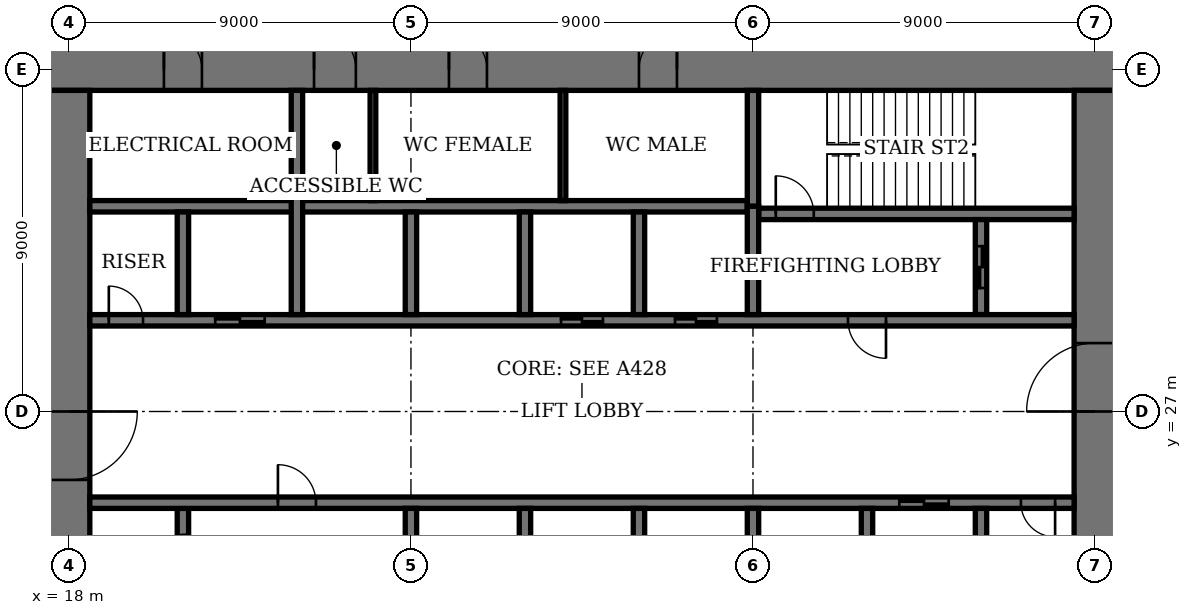
"""IFC4 building model, lengths in metres.
Left out: names, types, materials, properties, quantities, classifications, styles, units other than length and angle.
Written with IfcOpenShell. Run it as: python <this file> out.ifc"""

import sys

from ifc_helpers import new_model, si_unit, direction, frame, frame_2d, origin, place, context, subcontext, project, spatial, rectangle, extrude, element, fill, save


model = new_model("IFC4")
c1 = context("Model", 3, precision=1e-05, world=origin(), true_north=direction((0.0, 1.0)))
c2 = subcontext(c1, "Body", "Model", "MODEL_VIEW")
j1 = project(units=[si_unit("LENGTHUNIT", "METRE"), si_unit("PLANEANGLEUNIT", "RADIAN")], contexts=[c1])
p1 = place(None, origin())
s1 = spatial("IfcSite", under=j1, at=p1, CompositionType="ELEMENT")
p2 = place(p1, origin())
s2 = spatial("IfcBuilding", under=s1, at=p2, CompositionType="ELEMENT")
p3 = place(p2, frame((0.0, 0.0, 129.0)))
s3 = spatial("IfcBuildingStorey", under=s2, at=p3, CompositionType="ELEMENT", Elevation=129.0)
p4 = place(p3, frame((45.55, 36.0, 0.0), z_axis=(0.0, 0.0, 1.0), x_axis=(-1.0, 0.0, 0.0)))
e1 = element("IfcWall", 1, at=p4, inside=s3, PredefinedType="SHEAR", context=c2, shape_type="SweptSolid", body=[
    extrude(rectangle(XDim=28.1, YDim=1.1, at=frame_2d((14.05, 0.0))), origin(), (0.0, 0.0, 1.0), 4.0),
])
p5 = place(p4, frame((11.55, 0.0, 0.0)))
e2 = element("IfcOpeningElement", 2, at=p5, cuts=e1, PredefinedType="OPENING", context=c2, shape_type="SweptSolid", body=[
    extrude(rectangle(XDim=1.0, YDim=2.4, at=frame_2d((0.5, 1.2))), frame((0.0, 0.56, 0.0), z_axis=(0.0, -1.0, 0.0), x_axis=(1.0, 0.0, 0.0)), (0.0, 0.0, 1.0), 1.12),
])
p6 = place(p4, frame((16.55, 0.0, 0.0)))
e3 = element("IfcOpeningElement", 3, at=p6, cuts=e1, PredefinedType="OPENING", context=c2, shape_type="SweptSolid", body=[
    extrude(rectangle(XDim=1.0, YDim=2.4, at=frame_2d((0.5, 1.2))), frame((0.0, 0.56, 0.0), z_axis=(0.0, -1.0, 0.0), x_axis=(1.0, 0.0, 0.0)), (0.0, 0.0, 1.0), 1.12),
])
p7 = place(p4, frame((20.0, 0.0, 0.0)))
e4 = element("IfcOpeningElement", 4, at=p7, cuts=e1, PredefinedType="OPENING", context=c2, shape_type="SweptSolid", body=[
    extrude(rectangle(XDim=1.1, YDim=2.4, at=frame_2d((0.55, 1.2))), frame((0.0, 0.56, 0.0), z_axis=(0.0, -1.0, 0.0), x_axis=(1.0, 0.0, 0.0)), (0.0, 0.0, 1.0), 1.12),
])
p8 = place(p4, frame((24.05, 0.0, 0.0)))
e5 = element("IfcOpeningElement", 5, at=p8, cuts=e1, PredefinedType="OPENING", context=c2, shape_type="SweptSolid", body=[
    extrude(rectangle(XDim=1.0, YDim=2.4, at=frame_2d((0.5, 1.2))), frame((0.0, 0.56, 0.0), z_axis=(0.0, -1.0, 0.0), x_axis=(1.0, 0.0, 0.0)), (0.0, 0.0, 1.0), 1.12),
])
p9 = place(p3, frame((18.0, 35.45, 0.0), z_axis=(0.0, 0.0, 1.0), x_axis=(0.0, -1.0, 0.0)))
e6 = element("IfcWall", 6, at=p9, inside=s3, PredefinedType="SHEAR", context=c2, shape_type="SweptSolid", body=[
    extrude(rectangle(XDim=16.9, YDim=1.1, at=frame_2d((8.45, 0.0))), origin(), (0.0, 0.0, 1.0), 4.0),
])
p10 = place(p9, frame((8.45, 0.0, 0.0)))
e7 = element("IfcOpeningElement", 7, at=p10, cuts=e6, PredefinedType="OPENING", context=c2, shape_type="SweptSolid", body=[
    extrude(rectangle(XDim=1.8, YDim=2.4, at=frame_2d((0.9, 1.2))), frame((0.0, 0.56, 0.0), z_axis=(0.0, -1.0, 0.0), x_axis=(1.0, 0.0, 0.0)), (0.0, 0.0, 1.0), 1.12),
])
p11 = place(p3, frame((45.0, 18.55, 0.0), z_axis=(0.0, 0.0, 1.0), x_axis=(0.0, 1.0, 0.0)))
e8 = element("IfcWall", 8, at=p11, inside=s3, PredefinedType="SHEAR", context=c2, shape_type="SweptSolid", body=[
    extrude(rectangle(XDim=16.9, YDim=1.1, at=frame_2d((8.45, 0.0))), origin(), (0.0, 0.0, 1.0), 4.0),
])
p12 = place(p11, frame((8.45, 0.0, 0.0)))
e9 = element("IfcOpeningElement", 9, at=p12, cuts=e8, PredefinedType="OPENING", context=c2, shape_type="SweptSolid", body=[
    extrude(rectangle(XDim=1.8, YDim=2.4, at=frame_2d((0.9, 1.2))), frame((0.0, 0.56, 0.0), z_axis=(0.0, -1.0, 0.0), x_axis=(1.0, 0.0, 0.0)), (0.0, 0.0, 1.0), 1.12),
])
p13 = place(p3, frame((36.15, 32.2, 0.0), z_axis=(0.0, 0.0, 1.0), x_axis=(1.0, 0.0, 0.0)))
e10 = element("IfcWall", 10, at=p13, inside=s3, PredefinedType="SHEAR", context=c2, shape_type="SweptSolid", body=[
    extrude(rectangle(XDim=8.3, YDim=0.3, at=frame_2d((4.15, 0.0))), origin(), (0.0, 0.0, 1.0), 4.0),
])
p14 = place(p13, frame((0.45, 0.0, 0.0)))
e11 = element("IfcOpeningElement", 11, at=p14, cuts=e10, PredefinedType="OPENING", context=c2, shape_type="SweptSolid", body=[
    extrude(rectangle(XDim=1.0, YDim=2.4, at=frame_2d((0.5, 1.2))), frame((0.0, 0.16, 0.0), z_axis=(0.0, -1.0, 0.0), x_axis=(1.0, 0.0, 0.0)), (0.0, 0.0, 1.0), 0.32),
])
p15 = place(p3, frame((36.0, 32.4, 0.0), z_axis=(0.0, 0.0, 1.0), x_axis=(0.0, 1.0, 0.0)))
e12 = element("IfcWall", 12, at=p15, inside=s3, PredefinedType="SHEAR", context=c2, shape_type="SweptSolid", body=[
    extrude(rectangle(XDim=3.05, YDim=0.3, at=frame_2d((1.525, 0.0))), origin(), (0.0, 0.0, 1.0), 4.0),
])
p16 = place(p3, frame((21.0, 21.95, 0.0), z_axis=(0.0, 0.0, 1.0), x_axis=(0.0, 1.0, 0.0)))
e13 = element("IfcWall", 13, at=p16, inside=s3, PredefinedType="SHEAR", context=c2, shape_type="SweptSolid", body=[
    extrude(rectangle(XDim=2.5, YDim=0.3, at=frame_2d((1.25, 0.0))), origin(), (0.0, 0.0, 1.0), 4.0),
])
p17 = place(p16, frame((0.7, 0.0, 0.0)))
e14 = element("IfcOpeningElement", 14, at=p17, cuts=e13, PredefinedType="OPENING", context=c2, shape_type="SweptSolid", body=[
    extrude(rectangle(XDim=1.1, YDim=2.4, at=frame_2d((0.55, 1.2))), frame((0.0, 0.16, 0.0), z_axis=(0.0, -1.0, 0.0), x_axis=(1.0, 0.0, 0.0)), (0.0, 0.0, 1.0), 0.32),
])
p18 = place(p3, frame((42.0, 29.55, 0.0), z_axis=(0.0, 0.0, 1.0), x_axis=(0.0, 1.0, 0.0)))
e15 = element("IfcWall", 15, at=p18, inside=s3, PredefinedType="SHEAR", context=c2, shape_type="SweptSolid", body=[
    extrude(rectangle(XDim=2.5, YDim=0.3, at=frame_2d((1.25, 0.0))), origin(), (0.0, 0.0, 1.0), 4.0),
])
p19 = place(p18, frame((0.7, 0.0, 0.0)))
e16 = element("IfcOpeningElement", 16, at=p19, cuts=e15, PredefinedType="OPENING", context=c2, shape_type="SweptSolid", body=[
    extrude(rectangle(XDim=1.1, YDim=2.4, at=frame_2d((0.55, 1.2))), frame((0.0, 0.16, 0.0), z_axis=(0.0, -1.0, 0.0), x_axis=(1.0, 0.0, 0.0)), (0.0, 0.0, 1.0), 0.32),
])
p20 = place(p3, frame((18.55, 24.6, 0.0), z_axis=(0.0, 0.0, 1.0), x_axis=(1.0, 0.0, 0.0)))
e17 = element("IfcWall", 17, at=p20, inside=s3, PredefinedType="SHEAR", context=c2, shape_type="SweptSolid", body=[
    extrude(rectangle(XDim=25.9, YDim=0.3, at=frame_2d((12.95, 0.0))), origin(), (0.0, 0.0, 1.0), 4.0),
])
p21 = place(p20, frame((4.95, 0.0, 0.0)))
e18 = element("IfcOpeningElement", 18, at=p21, cuts=e17, PredefinedType="OPENING", context=c2, shape_type="SweptSolid", body=[
    extrude(rectangle(XDim=1.0, YDim=2.4, at=frame_2d((0.5, 1.2))), frame((0.0, 0.16, 0.0), z_axis=(0.0, -1.0, 0.0), x_axis=(1.0, 0.0, 0.0)), (0.0, 0.0, 1.0), 0.32),
])
p22 = place(p20, frame((24.5, 0.0, 0.0)))
e19 = element("IfcOpeningElement", 19, at=p22, cuts=e17, PredefinedType="OPENING", context=c2, shape_type="SweptSolid", body=[
    extrude(rectangle(XDim=0.9, YDim=2.1, at=frame_2d((0.45, 1.05))), frame((0.0, 0.16, 0.0), z_axis=(0.0, -1.0, 0.0), x_axis=(1.0, 0.0, 0.0)), (0.0, 0.0, 1.0), 0.32),
])
p23 = place(p20, frame((21.3, 0.0, 0.0)))
e20 = element("IfcOpeningElement", 20, at=p23, cuts=e17, PredefinedType="OPENING", context=c2, shape_type="SweptSolid", body=[
    extrude(rectangle(XDim=1.3, YDim=2.4, at=frame_2d((0.65, 1.2))), frame((0.0, 0.16, 0.0), z_axis=(0.0, -1.0, 0.0), x_axis=(1.0, 0.0, 0.0)), (0.0, 0.0, 1.0), 0.32),
])
p24 = place(p3, frame((18.55, 29.4, 0.0), z_axis=(0.0, 0.0, 1.0), x_axis=(1.0, 0.0, 0.0)))
e21 = element("IfcWall", 21, at=p24, inside=s3, PredefinedType="SHEAR", context=c2, shape_type="SweptSolid", body=[
    extrude(rectangle(XDim=25.9, YDim=0.3, at=frame_2d((12.95, 0.0))), origin(), (0.0, 0.0, 1.0), 4.0),
])
p25 = place(p24, frame((19.95, 0.0, 0.0)))
e22 = element("IfcOpeningElement", 22, at=p25, cuts=e21, PredefinedType="OPENING", context=c2, shape_type="SweptSolid", body=[
    extrude(rectangle(XDim=1.0, YDim=2.4, at=frame_2d((0.5, 1.2))), frame((0.0, 0.16, 0.0), z_axis=(0.0, -1.0, 0.0), x_axis=(1.0, 0.0, 0.0)), (0.0, 0.0, 1.0), 0.32),
])
p26 = place(p24, frame((0.5, 0.0, 0.0)))
e23 = element("IfcOpeningElement", 23, at=p26, cuts=e21, PredefinedType="OPENING", context=c2, shape_type="SweptSolid", body=[
    extrude(rectangle(XDim=0.9, YDim=2.1, at=frame_2d((0.45, 1.05))), frame((0.0, 0.16, 0.0), z_axis=(0.0, -1.0, 0.0), x_axis=(1.0, 0.0, 0.0)), (0.0, 0.0, 1.0), 0.32),
])
p27 = place(p24, frame((15.4, 0.0, 0.0)))
e24 = element("IfcOpeningElement", 24, at=p27, cuts=e21, PredefinedType="OPENING", context=c2, shape_type="SweptSolid", body=[
    extrude(rectangle(XDim=1.1, YDim=2.4, at=frame_2d((0.55, 1.2))), frame((0.0, 0.16, 0.0), z_axis=(0.0, -1.0, 0.0), x_axis=(1.0, 0.0, 0.0)), (0.0, 0.0, 1.0), 0.32),
])
p28 = place(p24, frame((12.4, 0.0, 0.0)))
e25 = element("IfcOpeningElement", 25, at=p28, cuts=e21, PredefinedType="OPENING", context=c2, shape_type="SweptSolid", body=[
    extrude(rectangle(XDim=1.1, YDim=2.4, at=frame_2d((0.55, 1.2))), frame((0.0, 0.16, 0.0), z_axis=(0.0, -1.0, 0.0), x_axis=(1.0, 0.0, 0.0)), (0.0, 0.0, 1.0), 0.32),
])
p29 = place(p24, frame((3.3, 0.0, 0.0)))
e26 = element("IfcOpeningElement", 26, at=p29, cuts=e21, PredefinedType="OPENING", context=c2, shape_type="SweptSolid", body=[
    extrude(rectangle(XDim=1.3, YDim=2.4, at=frame_2d((0.65, 1.2))), frame((0.0, 0.16, 0.0), z_axis=(0.0, -1.0, 0.0), x_axis=(1.0, 0.0, 0.0)), (0.0, 0.0, 1.0), 0.32),
])
p30 = place(p3, frame((18.55, 32.4, 0.0), z_axis=(0.0, 0.0, 1.0), x_axis=(1.0, 0.0, 0.0)))
e27 = element("IfcWall", 27, at=p30, inside=s3, PredefinedType="SHEAR", context=c2, shape_type="SweptSolid", body=[
    extrude(rectangle(XDim=17.3, YDim=0.3, at=frame_2d((8.65, 0.0))), origin(), (0.0, 0.0, 1.0), 4.0),
])
for number, where, z_axis, x_axis in (
    (28, (30.0, 21.75, 0.0), (0.0, 0.0, 1.0), (0.0, 1.0, 0.0)),
    (29, (33.0, 29.55, 0.0), (0.0, 0.0, 1.0), (0.0, 1.0, 0.0)),
    (30, (33.0, 21.75, 0.0), (0.0, 0.0, 1.0), (0.0, 1.0, 0.0)),
    (31, (30.0, 29.55, 0.0), (0.0, 0.0, 1.0), (0.0, 1.0, 0.0)),
    (32, (36.0, 21.75, 0.0), (0.0, 0.0, 1.0), (0.0, 1.0, 0.0)),
    (33, (27.0, 29.55, 0.0), (0.0, 0.0, 1.0), (0.0, 1.0, 0.0)),
):
    element("IfcWall", number, at=place(p3, frame(where, z_axis=z_axis, x_axis=x_axis)), inside=s3, PredefinedType="SHEAR", context=c2, shape_type="SweptSolid", body=[
        extrude(rectangle(XDim=2.7, YDim=0.3, at=frame_2d((1.35, 0.0))), origin(), (0.0, 0.0, 1.0), 4.0),
    ])
for number, where, z_axis, x_axis in (
    (34, (39.0, 18.55, 0.0), (0.0, 0.0, 1.0), (0.0, 1.0, 0.0)),
    (35, (24.0, 29.55, 0.0), (0.0, 0.0, 1.0), (0.0, 1.0, 0.0)),
):
    element("IfcWall", number, at=place(p3, frame(where, z_axis=z_axis, x_axis=x_axis)), inside=s3, PredefinedType="SHEAR", context=c2, shape_type="SweptSolid", body=[
        extrude(rectangle(XDim=5.9, YDim=0.3, at=frame_2d((2.95, 0.0))), origin(), (0.0, 0.0, 1.0), 4.0),
    ])
for number, where, z_axis, x_axis in (
    (36, (42.0, 21.75, 0.0), (0.0, 0.0, 1.0), (0.0, 1.0, 0.0)),
    (37, (21.0, 29.55, 0.0), (0.0, 0.0, 1.0), (0.0, 1.0, 0.0)),
):
    element("IfcWall", number, at=place(p3, frame(where, z_axis=z_axis, x_axis=x_axis)), inside=s3, PredefinedType="SHEAR", context=c2, shape_type="SweptSolid", body=[
        extrude(rectangle(XDim=2.7, YDim=0.3, at=frame_2d((1.35, 0.0))), origin(), (0.0, 0.0, 1.0), 4.0),
    ])
for number, where, z_axis, x_axis in (
    (38, (27.0, 21.6, 0.0), (0.0, 0.0, 1.0), (0.0, 1.0, 0.0)),
    (39, (36.0, 29.55, 0.0), (0.0, 0.0, 1.0), (0.0, 1.0, 0.0)),
):
    element("IfcWall", number, at=place(p3, frame(where, z_axis=z_axis, x_axis=x_axis)), inside=s3, PredefinedType="SHEAR", context=c2, shape_type="SweptSolid", body=[
        extrude(rectangle(XDim=2.85, YDim=0.3, at=frame_2d((1.425, 0.0))), origin(), (0.0, 0.0, 1.0), 4.0),
    ])
for number, where, z_axis, x_axis in (
    (40, (31.0, 32.55, 0.0), (0.0, 0.0, 1.0), (0.0, 1.0, 0.0)),
    (41, (26.0, 32.55, 0.0), (0.0, 0.0, 1.0), (0.0, 1.0, 0.0)),
):
    element("IfcWall", number, at=place(p3, frame(where, z_axis=z_axis, x_axis=x_axis)), inside=s3, PredefinedType="PARTITIONING", context=c2, shape_type="SweptSolid", body=[
        extrude(rectangle(XDim=2.9, YDim=0.15, at=frame_2d((1.45, 0.0))), origin(), (0.0, 0.0, 1.0), 3.75),
    ])
p31 = place(p10, origin())
e42 = element("IfcDoor", 42, at=p31, inside=s3, OperationType="DOUBLE_DOOR_DOUBLE_SWING", PredefinedType="DOOR", context=c2, shape_type="SweptSolid", body=[
    extrude(rectangle(XDim=1.8, YDim=2.4, at=frame_2d((0.9, 1.2))), frame((0.0, 0.03, 0.0), z_axis=(0.0, -1.0, 0.0), x_axis=(1.0, 0.0, 0.0)), (0.0, 0.0, 1.0), 0.06),
    extrude(rectangle(XDim=0.04, YDim=2.4, at=frame_2d((0.02, 1.2))), frame((0.0, 0.55, 0.0), z_axis=(0.0, -1.0, 0.0), x_axis=(1.0, 0.0, 0.0)), (0.0, 0.0, 1.0), 1.1),
    extrude(rectangle(XDim=0.04, YDim=2.4, at=frame_2d((1.78, 1.2))), frame((0.0, 0.55, 0.0), z_axis=(0.0, -1.0, 0.0), x_axis=(1.0, 0.0, 0.0)), (0.0, 0.0, 1.0), 1.1),
    extrude(rectangle(XDim=1.8, YDim=0.04, at=frame_2d((0.9, 2.38))), frame((0.0, 0.55, 0.0), z_axis=(0.0, -1.0, 0.0), x_axis=(1.0, 0.0, 0.0)), (0.0, 0.0, 1.0), 1.1),
])
fill(e7, e42)
p32 = place(p12, origin())
e43 = element("IfcDoor", 43, at=p32, inside=s3, OperationType="DOUBLE_DOOR_DOUBLE_SWING", PredefinedType="DOOR", context=c2, shape_type="SweptSolid", body=[
    extrude(rectangle(XDim=1.8, YDim=2.4, at=frame_2d((0.9, 1.2))), frame((0.0, 0.03, 0.0), z_axis=(0.0, -1.0, 0.0), x_axis=(1.0, 0.0, 0.0)), (0.0, 0.0, 1.0), 0.06),
    extrude(rectangle(XDim=0.04, YDim=2.4, at=frame_2d((0.02, 1.2))), frame((0.0, 0.55, 0.0), z_axis=(0.0, -1.0, 0.0), x_axis=(1.0, 0.0, 0.0)), (0.0, 0.0, 1.0), 1.1),
    extrude(rectangle(XDim=0.04, YDim=2.4, at=frame_2d((1.78, 1.2))), frame((0.0, 0.55, 0.0), z_axis=(0.0, -1.0, 0.0), x_axis=(1.0, 0.0, 0.0)), (0.0, 0.0, 1.0), 1.1),
    extrude(rectangle(XDim=1.8, YDim=0.04, at=frame_2d((0.9, 2.38))), frame((0.0, 0.55, 0.0), z_axis=(0.0, -1.0, 0.0), x_axis=(1.0, 0.0, 0.0)), (0.0, 0.0, 1.0), 1.1),
])
fill(e9, e43)
p33 = place(p5, origin())
e44 = element("IfcDoor", 44, at=p33, inside=s3, OperationType="SINGLE_SWING_LEFT", PredefinedType="DOOR", context=c2, shape_type="SweptSolid", body=[
    extrude(rectangle(XDim=1.0, YDim=2.4, at=frame_2d((0.5, 1.2))), frame((0.0, 0.025, 0.0), z_axis=(0.0, -1.0, 0.0), x_axis=(1.0, 0.0, 0.0)), (0.0, 0.0, 1.0), 0.05),
    extrude(rectangle(XDim=0.04, YDim=2.4, at=frame_2d((0.02, 1.2))), frame((0.0, 0.4, 0.0), z_axis=(0.0, -1.0, 0.0), x_axis=(1.0, 0.0, 0.0)), (0.0, 0.0, 1.0), 0.8),
    extrude(rectangle(XDim=0.04, YDim=2.4, at=frame_2d((0.98, 1.2))), frame((0.0, 0.4, 0.0), z_axis=(0.0, -1.0, 0.0), x_axis=(1.0, 0.0, 0.0)), (0.0, 0.0, 1.0), 0.8),
    extrude(rectangle(XDim=1.0, YDim=0.04, at=frame_2d((0.5, 2.38))), frame((0.0, 0.4, 0.0), z_axis=(0.0, -1.0, 0.0), x_axis=(1.0, 0.0, 0.0)), (0.0, 0.0, 1.0), 0.8),
])
fill(e2, e44)
p34 = place(p6, origin())
e45 = element("IfcDoor", 45, at=p34, inside=s3, OperationType="SINGLE_SWING_RIGHT", PredefinedType="DOOR", context=c2, shape_type="SweptSolid", body=[
    extrude(rectangle(XDim=1.0, YDim=2.4, at=frame_2d((0.5, 1.2))), frame((0.0, 0.025, 0.0), z_axis=(0.0, -1.0, 0.0), x_axis=(1.0, 0.0, 0.0)), (0.0, 0.0, 1.0), 0.05),
    extrude(rectangle(XDim=0.04, YDim=2.4, at=frame_2d((0.02, 1.2))), frame((0.0, 0.4, 0.0), z_axis=(0.0, -1.0, 0.0), x_axis=(1.0, 0.0, 0.0)), (0.0, 0.0, 1.0), 0.8),
    extrude(rectangle(XDim=0.04, YDim=2.4, at=frame_2d((0.98, 1.2))), frame((0.0, 0.4, 0.0), z_axis=(0.0, -1.0, 0.0), x_axis=(1.0, 0.0, 0.0)), (0.0, 0.0, 1.0), 0.8),
    extrude(rectangle(XDim=1.0, YDim=0.04, at=frame_2d((0.5, 2.38))), frame((0.0, 0.4, 0.0), z_axis=(0.0, -1.0, 0.0), x_axis=(1.0, 0.0, 0.0)), (0.0, 0.0, 1.0), 0.8),
])
fill(e3, e45)
p35 = place(p7, origin())
e46 = element("IfcDoor", 46, at=p35, inside=s3, OperationType="SINGLE_SWING_RIGHT", PredefinedType="DOOR", context=c2, shape_type="SweptSolid", body=[
    extrude(rectangle(XDim=1.1, YDim=2.4, at=frame_2d((0.55, 1.2))), frame((0.0, 0.025, 0.0), z_axis=(0.0, -1.0, 0.0), x_axis=(1.0, 0.0, 0.0)), (0.0, 0.0, 1.0), 0.05),
    extrude(rectangle(XDim=0.04, YDim=2.4, at=frame_2d((0.02, 1.2))), frame((0.0, 0.44, 0.0), z_axis=(0.0, -1.0, 0.0), x_axis=(1.0, 0.0, 0.0)), (0.0, 0.0, 1.0), 0.88),
    extrude(rectangle(XDim=0.04, YDim=2.4, at=frame_2d((1.08, 1.2))), frame((0.0, 0.44, 0.0), z_axis=(0.0, -1.0, 0.0), x_axis=(1.0, 0.0, 0.0)), (0.0, 0.0, 1.0), 0.88),
    extrude(rectangle(XDim=1.1, YDim=0.04, at=frame_2d((0.55, 2.38))), frame((0.0, 0.44, 0.0), z_axis=(0.0, -1.0, 0.0), x_axis=(1.0, 0.0, 0.0)), (0.0, 0.0, 1.0), 0.88),
])
fill(e4, e46)
p36 = place(p8, origin())
e47 = element("IfcDoor", 47, at=p36, inside=s3, OperationType="SINGLE_SWING_RIGHT", PredefinedType="DOOR", context=c2, shape_type="SweptSolid", body=[
    extrude(rectangle(XDim=1.0, YDim=2.4, at=frame_2d((0.5, 1.2))), frame((0.0, 0.025, 0.0), z_axis=(0.0, -1.0, 0.0), x_axis=(1.0, 0.0, 0.0)), (0.0, 0.0, 1.0), 0.05),
    extrude(rectangle(XDim=0.04, YDim=2.4, at=frame_2d((0.02, 1.2))), frame((0.0, 0.4, 0.0), z_axis=(0.0, -1.0, 0.0), x_axis=(1.0, 0.0, 0.0)), (0.0, 0.0, 1.0), 0.8),
    extrude(rectangle(XDim=0.04, YDim=2.4, at=frame_2d((0.98, 1.2))), frame((0.0, 0.4, 0.0), z_axis=(0.0, -1.0, 0.0), x_axis=(1.0, 0.0, 0.0)), (0.0, 0.0, 1.0), 0.8),
    extrude(rectangle(XDim=1.0, YDim=0.04, at=frame_2d((0.5, 2.38))), frame((0.0, 0.4, 0.0), z_axis=(0.0, -1.0, 0.0), x_axis=(1.0, 0.0, 0.0)), (0.0, 0.0, 1.0), 0.8),
])
fill(e5, e47)
p37 = place(p14, origin())
e48 = element("IfcDoor", 48, at=p37, inside=s3, OperationType="SINGLE_SWING_RIGHT", PredefinedType="DOOR", context=c2, shape_type="SweptSolid", body=[
    extrude(rectangle(XDim=1.0, YDim=2.4, at=frame_2d((0.5, 1.2))), frame((0.0, 0.03, 0.0), z_axis=(0.0, -1.0, 0.0), x_axis=(1.0, 0.0, 0.0)), (0.0, 0.0, 1.0), 0.06),
])
fill(e11, e48)
p38 = place(p21, origin())
e49 = element("IfcDoor", 49, at=p38, inside=s3, OperationType="SINGLE_SWING_RIGHT", PredefinedType="DOOR", context=c2, shape_type="SweptSolid", body=[
    extrude(rectangle(XDim=1.0, YDim=2.4, at=frame_2d((0.5, 1.2))), frame((0.0, 0.03, 0.0), z_axis=(0.0, -1.0, 0.0), x_axis=(1.0, 0.0, 0.0)), (0.0, 0.0, 1.0), 0.06),
])
fill(e18, e49)
p39 = place(p25, origin())
e50 = element("IfcDoor", 50, at=p39, inside=s3, OperationType="SINGLE_SWING_RIGHT", PredefinedType="DOOR", context=c2, shape_type="SweptSolid", body=[
    extrude(rectangle(XDim=1.0, YDim=2.4, at=frame_2d((0.5, 1.2))), frame((0.0, 0.03, 0.0), z_axis=(0.0, -1.0, 0.0), x_axis=(1.0, 0.0, 0.0)), (0.0, 0.0, 1.0), 0.06),
])
fill(e22, e50)
p40 = place(p22, origin())
e51 = element("IfcDoor", 51, at=p40, inside=s3, OperationType="SINGLE_SWING_RIGHT", PredefinedType="DOOR", context=c2, shape_type="SweptSolid", body=[
    extrude(rectangle(XDim=0.9, YDim=2.1, at=frame_2d((0.45, 1.05))), frame((0.0, 0.03, 0.0), z_axis=(0.0, -1.0, 0.0), x_axis=(1.0, 0.0, 0.0)), (0.0, 0.0, 1.0), 0.06),
])
fill(e19, e51)
p41 = place(p26, origin())
e52 = element("IfcDoor", 52, at=p41, inside=s3, OperationType="SINGLE_SWING_RIGHT", PredefinedType="DOOR", context=c2, shape_type="SweptSolid", body=[
    extrude(rectangle(XDim=0.9, YDim=2.1, at=frame_2d((0.45, 1.05))), frame((0.0, 0.03, 0.0), z_axis=(0.0, -1.0, 0.0), x_axis=(1.0, 0.0, 0.0)), (0.0, 0.0, 1.0), 0.06),
])
fill(e23, e52)
p42 = place(p27, origin())
e53 = element("IfcDoor", 53, at=p42, inside=s3, OperationType="DOUBLE_DOOR_SLIDING", PredefinedType="DOOR", context=c2, shape_type="SweptSolid", body=[
    extrude(rectangle(XDim=1.1, YDim=2.4, at=frame_2d((0.55, 1.2))), frame((0.0, 0.02, 0.0), z_axis=(0.0, -1.0, 0.0), x_axis=(1.0, 0.0, 0.0)), (0.0, 0.0, 1.0), 0.04),
])
fill(e24, e53)
p43 = place(p28, origin())
e54 = element("IfcDoor", 54, at=p43, inside=s3, OperationType="DOUBLE_DOOR_SLIDING", PredefinedType="DOOR", context=c2, shape_type="SweptSolid", body=[
    extrude(rectangle(XDim=1.1, YDim=2.4, at=frame_2d((0.55, 1.2))), frame((0.0, 0.02, 0.0), z_axis=(0.0, -1.0, 0.0), x_axis=(1.0, 0.0, 0.0)), (0.0, 0.0, 1.0), 0.04),
])
fill(e25, e54)
p44 = place(p23, origin())
e55 = element("IfcDoor", 55, at=p44, inside=s3, OperationType="DOUBLE_DOOR_SLIDING", PredefinedType="DOOR", context=c2, shape_type="SweptSolid", body=[
    extrude(rectangle(XDim=1.3, YDim=2.4, at=frame_2d((0.65, 1.2))), frame((0.0, 0.02, 0.0), z_axis=(0.0, -1.0, 0.0), x_axis=(1.0, 0.0, 0.0)), (0.0, 0.0, 1.0), 0.04),
])
fill(e20, e55)
p45 = place(p29, origin())
e56 = element("IfcDoor", 56, at=p45, inside=s3, OperationType="DOUBLE_DOOR_SLIDING", PredefinedType="DOOR", context=c2, shape_type="SweptSolid", body=[
    extrude(rectangle(XDim=1.3, YDim=2.4, at=frame_2d((0.65, 1.2))), frame((0.0, 0.02, 0.0), z_axis=(0.0, -1.0, 0.0), x_axis=(1.0, 0.0, 0.0)), (0.0, 0.0, 1.0), 0.04),
])
fill(e26, e56)
p46 = place(p19, origin())
e57 = element("IfcDoor", 57, at=p46, inside=s3, OperationType="DOUBLE_DOOR_SLIDING", PredefinedType="DOOR", context=c2, shape_type="SweptSolid", body=[
    extrude(rectangle(XDim=1.1, YDim=2.4, at=frame_2d((0.55, 1.2))), frame((0.0, 0.03, 0.0), z_axis=(0.0, -1.0, 0.0), x_axis=(1.0, 0.0, 0.0)), (0.0, 0.0, 1.0), 0.06),
])
fill(e16, e57)
save(model, sys.argv[1])
